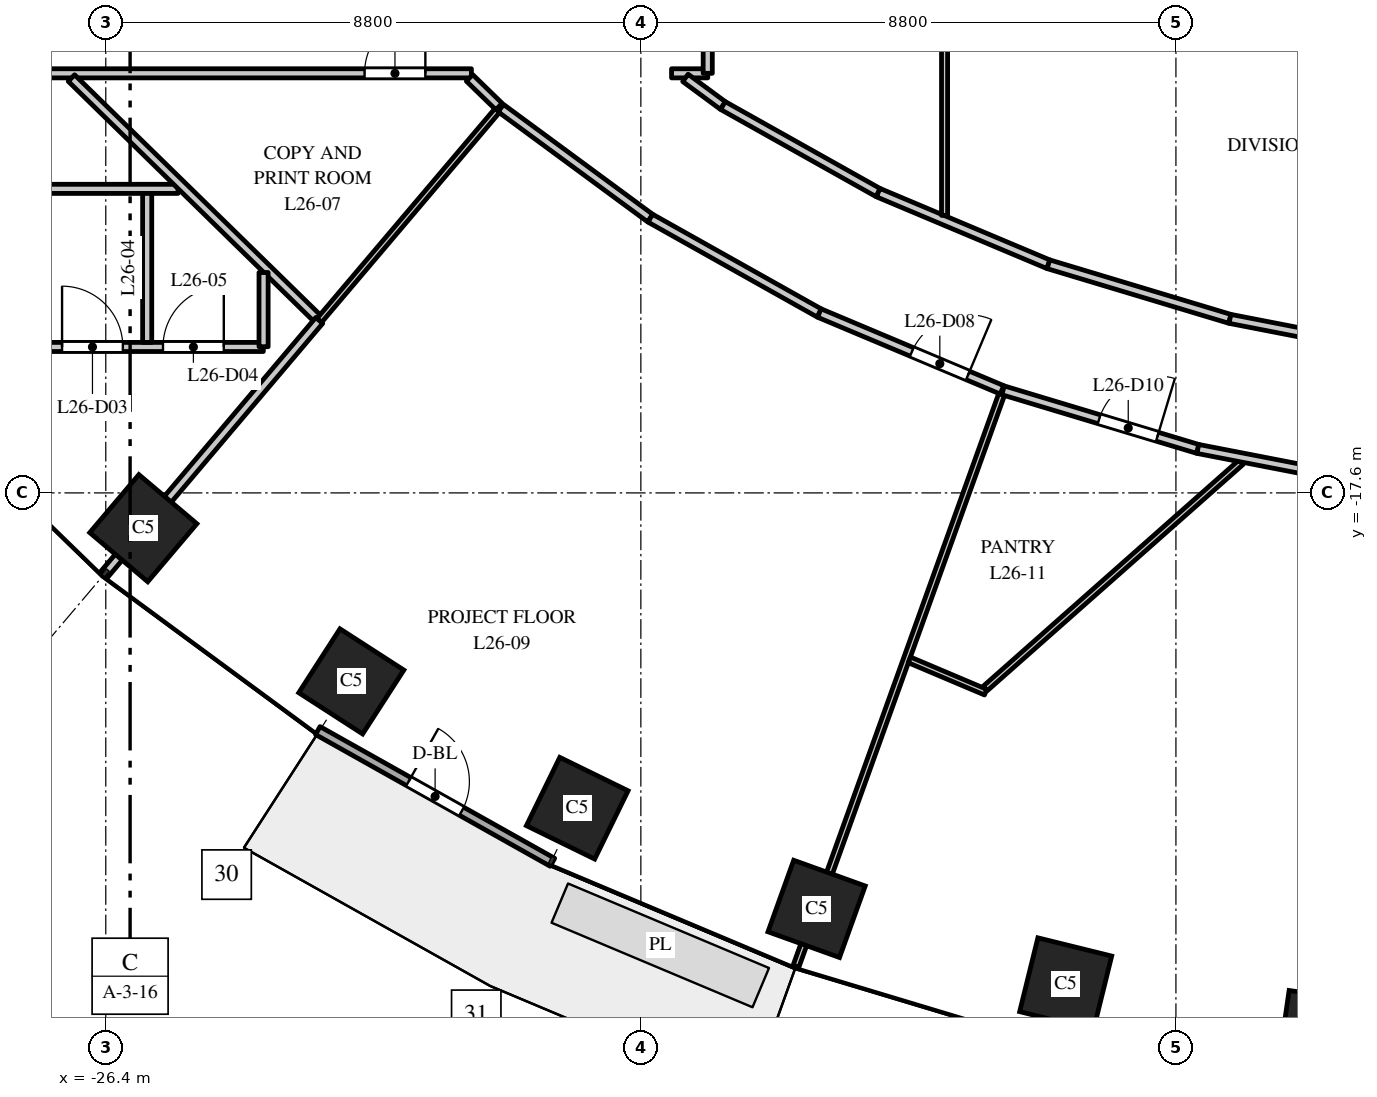
"""IFC4 building model, lengths in metres.
Left out: names, types, materials, properties, quantities, classifications, styles, units other than length and angle.
Written with IfcOpenShell. Run it as: python <this file> out.ifc"""

import sys

from ifc_helpers import new_model, si_unit, direction, frame, frame_2d, origin, origin_2d, place, context, subcontext, project, spatial, rectangle, extrude, element, fill, save


model = new_model("IFC4")
c1 = context("Model", 3, precision=1e-05, world=origin(), true_north=direction((0.0, 1.0)))
c2 = subcontext(c1, "Body", "Model", "MODEL_VIEW")
j1 = project(units=[si_unit("LENGTHUNIT", "METRE"), si_unit("PLANEANGLEUNIT", "RADIAN")], contexts=[c1])
p1 = place(None, origin())
s1 = spatial("IfcSite", under=j1, at=p1, CompositionType="ELEMENT")
p2 = place(p1, origin())
s2 = spatial("IfcBuilding", under=s1, at=p2, CompositionType="ELEMENT")
p3 = place(p2, frame((0.0, 0.0, 116.0)))
s3 = spatial("IfcBuildingStorey", under=s2, at=p3, CompositionType="ELEMENT", Elevation=116.0)
for number, where, z_axis, x_axis in (
    (1, (-25.783, -18.18, 0.0), (0.0, 0.0, 1.0), (0.763, -0.646, 0.0)),
    (2, (-22.362, -20.7, 0.0), (0.0, 0.0, 1.0), (0.84, -0.542, 0.0)),
    (3, (-18.646, -22.785, 0.0), (0.0, 0.0, 1.0), (0.898, -0.439, 0.0)),
    (4, (-14.709, -24.441, 0.0), (0.0, 0.0, 1.0), (0.941, -0.338, 0.0)),
    (5, (-10.613, -25.674, 0.0), (0.0, 0.0, 1.0), (0.971, -0.24, 0.0)),
    (6, (-6.409, -26.491, 0.0), (0.0, 0.0, 1.0), (0.99, -0.143, 0.0)),
):
    element("IfcColumn", number, at=place(p3, frame(where, z_axis=z_axis, x_axis=x_axis)), inside=s3, PredefinedType="COLUMN", context=c2, shape_type="SweptSolid", body=[
        extrude(rectangle(XDim=1.25, YDim=1.25, at=origin_2d()), origin(), (0.0, 0.0, 1.0), 4.0),
    ])
p4 = place(p3, frame((-22.913, -21.509, 0.0), z_axis=(0.0, 0.0, 1.0), x_axis=(0.872046572975, -0.489422899509, 0.0)))
e7 = element("IfcWall", 7, at=p4, inside=s3, PredefinedType="STANDARD", context=c2, shape_type="SweptSolid", body=[
    extrude(rectangle(XDim=4.426, YDim=0.15, at=frame_2d((2.213, 0.0))), origin(), (0.0, 0.0, 1.0), 3.7),
])
p5 = place(p4, frame((1.713, 0.0, 0.0)))
e8 = element("IfcOpeningElement", 8, at=p5, cuts=e7, PredefinedType="OPENING", context=c2, shape_type="SweptSolid", body=[
    extrude(rectangle(XDim=1.0, YDim=2.4, at=frame_2d((0.5, 1.2))), frame((0.0, 0.085, 0.0), z_axis=(0.0, -1.0, 0.0), x_axis=(1.0, 0.0, 0.0)), (0.0, 0.0, 1.0), 0.17),
])
p6 = place(p3, frame((-31.5, -10.7, 0.0), z_axis=(0.0, 0.0, 1.0), x_axis=(1.0, 0.0, 0.0)))
e9 = element("IfcWall", 9, at=p6, inside=s3, PredefinedType="PARTITIONING", context=c2, shape_type="SweptSolid", body=[
    extrude(rectangle(XDim=11.113, YDim=0.15, at=frame_2d((5.557, 0.0))), origin(), (0.0, 0.0, 1.0), 3.1),
])
p7 = place(p6, frame((1.4, 0.0, 0.0)))
e10 = element("IfcOpeningElement", 10, at=p7, cuts=e9, PredefinedType="OPENING", context=c2, shape_type="SweptSolid", body=[
    extrude(rectangle(XDim=1.0, YDim=2.1, at=frame_2d((0.5, 1.05))), frame((0.0, 0.085, 0.0), z_axis=(0.0, -1.0, 0.0), x_axis=(1.0, 0.0, 0.0)), (0.0, 0.0, 1.0), 0.17),
])
p8 = place(p6, frame((9.356, 0.0, 0.0)))
e11 = element("IfcOpeningElement", 11, at=p8, cuts=e9, PredefinedType="OPENING", context=c2, shape_type="SweptSolid", body=[
    extrude(rectangle(XDim=1.0, YDim=2.1, at=frame_2d((0.5, 1.05))), frame((0.0, 0.085, 0.0), z_axis=(0.0, -1.0, 0.0), x_axis=(1.0, 0.0, 0.0)), (0.0, 0.0, 1.0), 0.17),
])
p9 = place(p3, frame((-29.605, -12.6, 0.0), z_axis=(0.0, 0.0, 1.0), x_axis=(1.0, 0.0, 0.0)))
e12 = element("IfcWall", 12, at=p9, inside=s3, PredefinedType="PARTITIONING", context=c2, shape_type="SweptSolid", body=[
    extrude(rectangle(XDim=4.393, YDim=0.15, at=frame_2d((2.197, 0.0))), origin(), (0.0, 0.0, 1.0), 3.7),
])
p10 = place(p3, frame((-29.601, -15.2, 0.0), z_axis=(0.0, 0.0, 1.0), x_axis=(1.0, 0.0, 0.0)))
e13 = element("IfcWall", 13, at=p10, inside=s3, PredefinedType="PARTITIONING", context=c2, shape_type="SweptSolid", body=[
    extrude(rectangle(XDim=5.792, YDim=0.15, at=frame_2d((2.896, 0.0))), origin(), (0.0, 0.0, 1.0), 2.9),
])
p11 = place(p10, frame((2.482, 0.0, 0.0)))
e14 = element("IfcOpeningElement", 14, at=p11, cuts=e13, PredefinedType="OPENING", context=c2, shape_type="SweptSolid", body=[
    extrude(rectangle(XDim=1.0, YDim=2.1, at=frame_2d((0.5, 1.05))), frame((0.0, 0.085, 0.0), z_axis=(0.0, -1.0, 0.0), x_axis=(1.0, 0.0, 0.0)), (0.0, 0.0, 1.0), 0.17),
])
p12 = place(p10, frame((4.142, 0.0, 0.0)))
e15 = element("IfcOpeningElement", 15, at=p12, cuts=e13, PredefinedType="OPENING", context=c2, shape_type="SweptSolid", body=[
    extrude(rectangle(XDim=1.0, YDim=2.1, at=frame_2d((0.5, 1.05))), frame((0.0, 0.085, 0.0), z_axis=(0.0, -1.0, 0.0), x_axis=(1.0, 0.0, 0.0)), (0.0, 0.0, 1.0), 0.17),
])
p13 = place(p3, frame((-26.965, -10.778, 0.0), z_axis=(0.0, 0.0, 1.0), x_axis=(0.715154119379, -0.698966798593, 0.0)))
e16 = element("IfcWall", 16, at=p13, inside=s3, PredefinedType="PARTITIONING", context=c2, shape_type="SweptSolid", body=[
    extrude(rectangle(XDim=5.701, YDim=0.15, at=frame_2d((2.851, 0.0))), origin(), (0.0, 0.0, 1.0), 3.7),
])
p14 = place(p3, frame((-26.43, -18.945, 0.0), z_axis=(0.0, 0.0, 1.0), x_axis=(0.646289642104, 0.763092195288, 0.0)))
e17 = element("IfcWall", 17, at=p14, inside=s3, PredefinedType="PARTITIONING", context=c2, shape_type="SweptSolid", body=[
    extrude(rectangle(XDim=5.48, YDim=0.15, at=frame_2d((2.74, 0.0))), origin(), (0.0, 0.0, 1.0), 2.75),
])
p15 = place(p3, frame((-25.719, -15.125, 0.0), z_axis=(0.0, 0.0, 1.0), x_axis=(0.0, 1.0, 0.0)))
e18 = element("IfcWall", 18, at=p15, inside=s3, PredefinedType="PARTITIONING", context=c2, shape_type="SweptSolid", body=[
    extrude(rectangle(XDim=2.45, YDim=0.15, at=frame_2d((1.225, 0.0))), origin(), (0.0, 0.0, 1.0), 3.7),
])
p16 = place(p3, frame((-23.805, -15.196, 0.0), z_axis=(0.0, 0.0, 1.0), x_axis=(0.0, 1.0, 0.0)))
e19 = element("IfcWall", 19, at=p16, inside=s3, PredefinedType="PARTITIONING", context=c2, shape_type="SweptSolid", body=[
    extrude(rectangle(XDim=1.22, YDim=0.15, at=frame_2d((0.61, 0.0))), origin(), (0.0, 0.0, 1.0), 3.7),
])
p17 = place(p3, frame((-22.888, -14.763, 0.0), z_axis=(0.0, 0.0, 1.0), x_axis=(0.646640834677, 0.7627946191, 0.0)))
e20 = element("IfcWall", 20, at=p17, inside=s3, PredefinedType="PARTITIONING", context=c2, shape_type="SweptSolid", body=[
    extrude(rectangle(XDim=4.588, YDim=0.1, at=frame_2d((2.294, 0.0))), origin(), (0.0, 0.0, 1.0), 3.7),
])
p18 = place(p3, frame((-20.418, -10.775, 0.0), z_axis=(0.0, 0.0, 1.0), x_axis=(0.717145300924, -0.69692368116, 0.0)))
e21 = element("IfcWall", 21, at=p18, inside=s3, PredefinedType="PARTITIONING", context=c2, shape_type="SweptSolid", body=[
    extrude(rectangle(XDim=0.676, YDim=0.15, at=frame_2d((0.338, 0.0))), origin(), (0.0, 0.0, 1.0), 3.7),
])
p19 = place(p3, frame((-19.903, -11.272, 0.0), z_axis=(0.0, 0.0, 1.0), x_axis=(0.805228684186, -0.592964388613, 0.0)))
e22 = element("IfcWall", 22, at=p19, inside=s3, PredefinedType="PARTITIONING", context=c2, shape_type="SweptSolid", body=[
    extrude(rectangle(XDim=3.052, YDim=0.15, at=frame_2d((1.526, 0.0))), origin(), (0.0, 0.0, 1.0), 2.75),
])
p20 = place(p3, frame((-17.445, -13.082, 0.0), z_axis=(0.0, 0.0, 1.0), x_axis=(0.872072095629, -0.489377420837, 0.0)))
e23 = element("IfcWall", 23, at=p20, inside=s3, PredefinedType="PARTITIONING", context=c2, shape_type="SweptSolid", body=[
    extrude(rectangle(XDim=3.188, YDim=0.15, at=frame_2d((1.594, 0.0))), origin(), (0.0, 0.0, 1.0), 3.7),
])
p21 = place(p3, frame((-17.095, -10.7, 0.0), z_axis=(0.0, 0.0, 1.0), x_axis=(1.0, 0.0, 0.0)))
e24 = element("IfcWall", 24, at=p21, inside=s3, PredefinedType="PARTITIONING", context=c2, shape_type="SweptSolid", body=[
    extrude(rectangle(XDim=0.595, YDim=0.15, at=frame_2d((0.297, 0.0))), origin(), (0.0, 0.0, 1.0), 3.7),
])
p22 = place(p3, frame((-16.867, -10.775, 0.0), z_axis=(0.0, 0.0, 1.0), x_axis=(0.804751563869, -0.593611759023, 0.0)))
e25 = element("IfcWall", 25, at=p22, inside=s3, PredefinedType="PARTITIONING", context=c2, shape_type="SweptSolid", body=[
    extrude(rectangle(XDim=0.767, YDim=0.15, at=frame_2d((0.383, 0.0))), origin(), (0.0, 0.0, 1.0), 3.7),
])
p23 = place(p3, frame((-16.5, -10.7, 0.0), z_axis=(0.0, 0.0, 1.0), x_axis=(0.0, 1.0, 0.0)))
e26 = element("IfcWall", 26, at=p23, inside=s3, PredefinedType="PARTITIONING", context=c2, shape_type="SweptSolid", body=[
    extrude(rectangle(XDim=0.736, YDim=0.15, at=frame_2d((0.368, 0.0))), origin(), (0.0, 0.0, 1.0), 3.7),
])
p24 = place(p3, frame((-16.25, -11.23, 0.0), z_axis=(0.0, 0.0, 1.0), x_axis=(0.872147381065, -0.489243237767, 0.0)))
e27 = element("IfcWall", 27, at=p24, inside=s3, PredefinedType="PARTITIONING", context=c2, shape_type="SweptSolid", body=[
    extrude(rectangle(XDim=2.927, YDim=0.15, at=frame_2d((1.464, 0.0))), origin(), (0.0, 0.0, 1.0), 2.75),
])
p25 = place(p3, frame((-15.048, -25.383, 0.0), z_axis=(0.0, 0.0, 1.0), x_axis=(0.338391154788, 0.941005540027, 0.0)))
e28 = element("IfcWall", 28, at=p25, inside=s3, PredefinedType="PARTITIONING", context=c2, shape_type="SweptSolid", body=[
    extrude(rectangle(XDim=10.06, YDim=0.1, at=frame_2d((5.03, 0.0))), origin(), (0.0, 0.0, 1.0), 2.9),
])
p26 = place(p3, frame((-14.665, -14.642, 0.0), z_axis=(0.0, 0.0, 1.0), x_axis=(0.921850993012, -0.387544509293, 0.0)))
e29 = element("IfcWall", 29, at=p26, inside=s3, PredefinedType="PARTITIONING", context=c2, shape_type="SweptSolid", body=[
    extrude(rectangle(XDim=3.259, YDim=0.15, at=frame_2d((1.629, 0.0))), origin(), (0.0, 0.0, 1.0), 2.85),
])
p27 = place(p26, frame((1.65, 0.0, 0.0)))
e30 = element("IfcOpeningElement", 30, at=p27, cuts=e29, PredefinedType="OPENING", context=c2, shape_type="SweptSolid", body=[
    extrude(rectangle(XDim=1.0, YDim=2.1, at=frame_2d((0.5, 1.05))), frame((0.0, 0.085, 0.0), z_axis=(0.0, -1.0, 0.0), x_axis=(1.0, 0.0, 0.0)), (0.0, 0.0, 1.0), 0.17),
])
p28 = place(p3, frame((-13.697, -12.662, 0.0), z_axis=(0.0, 0.0, 1.0), x_axis=(0.921751821358, -0.387780324183, 0.0)))
e31 = element("IfcWall", 31, at=p28, inside=s3, PredefinedType="PARTITIONING", context=c2, shape_type="SweptSolid", body=[
    extrude(rectangle(XDim=3.038, YDim=0.15, at=frame_2d((1.519, 0.0))), origin(), (0.0, 0.0, 1.0), 2.85),
])
p29 = place(p3, frame((-13.184, -20.346, 0.0), z_axis=(0.0, 0.0, 1.0), x_axis=(0.920969723526, -0.389634146794, 0.0)))
e32 = element("IfcWall", 32, at=p29, inside=s3, PredefinedType="PARTITIONING", context=c2, shape_type="SweptSolid", body=[
    extrude(rectangle(XDim=1.363, YDim=0.1, at=frame_2d((0.681, 0.0))), origin(), (0.0, 0.0, 1.0), 3.7),
])
p30 = place(p3, frame((-12.605, -13.036, 0.0), z_axis=(0.0, 0.0, 1.0), x_axis=(0.0, 1.0, 0.0)))
e33 = element("IfcWall", 33, at=p30, inside=s3, PredefinedType="PARTITIONING", context=c2, shape_type="SweptSolid", body=[
    extrude(rectangle(XDim=26.072, YDim=0.1, at=frame_2d((13.036, 0.0))), origin(), (0.0, 0.0, 1.0), 2.75),
])
p31 = place(p3, frame((-11.938, -20.818, 0.0), z_axis=(0.0, 0.0, 1.0), x_axis=(0.749089420646, 0.662468897289, 0.0)))
e34 = element("IfcWall", 34, at=p31, inside=s3, PredefinedType="PARTITIONING", context=c2, shape_type="SweptSolid", body=[
    extrude(rectangle(XDim=5.62, YDim=0.1, at=frame_2d((2.81, 0.0))), origin(), (0.0, 0.0, 1.0), 3.7),
])
p32 = place(p3, frame((-11.643, -15.913, 0.0), z_axis=(0.0, 0.0, 1.0), x_axis=(0.957584891346, -0.288151307243, 0.0)))
e35 = element("IfcWall", 35, at=p32, inside=s3, PredefinedType="PARTITIONING", context=c2, shape_type="SweptSolid", body=[
    extrude(rectangle(XDim=3.345, YDim=0.15, at=frame_2d((1.672, 0.0))), origin(), (0.0, 0.0, 1.0), 3.7),
])
p33 = place(p32, frame((1.65, 0.0, 0.0)))
e36 = element("IfcOpeningElement", 36, at=p33, cuts=e35, PredefinedType="OPENING", context=c2, shape_type="SweptSolid", body=[
    extrude(rectangle(XDim=1.0, YDim=2.1, at=frame_2d((0.5, 1.05))), frame((0.0, 0.085, 0.0), z_axis=(0.0, -1.0, 0.0), x_axis=(1.0, 0.0, 0.0)), (0.0, 0.0, 1.0), 0.17),
])
p34 = place(p3, frame((-10.897, -13.84, 0.0), z_axis=(0.0, 0.0, 1.0), x_axis=(0.957606118849, -0.28808075455, 0.0)))
e37 = element("IfcWall", 37, at=p34, inside=s3, PredefinedType="PARTITIONING", context=c2, shape_type="SweptSolid", body=[
    extrude(rectangle(XDim=3.117, YDim=0.15, at=frame_2d((1.559, 0.0))), origin(), (0.0, 0.0, 1.0), 3.7),
])
p35 = place(p3, frame((-8.44, -16.877, 0.0), z_axis=(0.0, 0.0, 1.0), x_axis=(0.981665220565, -0.190613207134, 0.0)))
e38 = element("IfcWall", 38, at=p35, inside=s3, PredefinedType="PARTITIONING", context=c2, shape_type="SweptSolid", body=[
    extrude(rectangle(XDim=3.389, YDim=0.15, at=frame_2d((1.695, 0.0))), origin(), (0.0, 0.0, 1.0), 2.85),
])
p36 = place(p3, frame((-7.912, -14.738, 0.0), z_axis=(0.0, 0.0, 1.0), x_axis=(0.981588545092, -0.191007665145, 0.0)))
e39 = element("IfcWall", 39, at=p36, inside=s3, PredefinedType="PARTITIONING", context=c2, shape_type="SweptSolid", body=[
    extrude(rectangle(XDim=3.172, YDim=0.15, at=frame_2d((1.586, 0.0))), origin(), (0.0, 0.0, 1.0), 2.85),
])
p37 = place(p5, origin())
e40 = element("IfcDoor", 40, at=p37, inside=s3, OperationType="SINGLE_SWING_LEFT", PredefinedType="DOOR", context=c2, shape_type="SweptSolid", body=[
    extrude(rectangle(XDim=1.0, YDim=2.4, at=frame_2d((0.5, 1.2))), frame((0.0, 0.025, 0.0), z_axis=(0.0, -1.0, 0.0), x_axis=(1.0, 0.0, 0.0)), (0.0, 0.0, 1.0), 0.05),
])
fill(e8, e40)
p38 = place(p11, origin())
e41 = element("IfcDoor", 41, at=p38, inside=s3, OperationType="SINGLE_SWING_LEFT", PredefinedType="DOOR", context=c2, shape_type="SweptSolid", body=[
    extrude(rectangle(XDim=1.0, YDim=2.1, at=frame_2d((0.5, 1.05))), frame((0.0, 0.025, 0.0), z_axis=(0.0, -1.0, 0.0), x_axis=(1.0, 0.0, 0.0)), (0.0, 0.0, 1.0), 0.05),
])
fill(e14, e41)
p39 = place(p12, origin())
e42 = element("IfcDoor", 42, at=p39, inside=s3, OperationType="SINGLE_SWING_RIGHT", PredefinedType="DOOR", context=c2, shape_type="SweptSolid", body=[
    extrude(rectangle(XDim=1.0, YDim=2.1, at=frame_2d((0.5, 1.05))), frame((0.0, 0.025, 0.0), z_axis=(0.0, -1.0, 0.0), x_axis=(1.0, 0.0, 0.0)), (0.0, 0.0, 1.0), 0.05),
])
fill(e15, e42)
p40 = place(p8, origin())
e43 = element("IfcDoor", 43, at=p40, inside=s3, OperationType="SINGLE_SWING_RIGHT", PredefinedType="DOOR", context=c2, shape_type="SweptSolid", body=[
    extrude(rectangle(XDim=1.0, YDim=2.1, at=frame_2d((0.5, 1.05))), frame((0.0, 0.025, 0.0), z_axis=(0.0, -1.0, 0.0), x_axis=(1.0, 0.0, 0.0)), (0.0, 0.0, 1.0), 0.05),
])
fill(e11, e43)
p41 = place(p27, origin())
e44 = element("IfcDoor", 44, at=p41, inside=s3, OperationType="SINGLE_SWING_RIGHT", PredefinedType="DOOR", context=c2, shape_type="SweptSolid", body=[
    extrude(rectangle(XDim=1.0, YDim=2.1, at=frame_2d((0.5, 1.05))), frame((0.0, 0.025, 0.0), z_axis=(0.0, -1.0, 0.0), x_axis=(1.0, 0.0, 0.0)), (0.0, 0.0, 1.0), 0.05),
])
fill(e30, e44)
p42 = place(p33, origin())
e45 = element("IfcDoor", 45, at=p42, inside=s3, OperationType="SINGLE_SWING_RIGHT", PredefinedType="DOOR", context=c2, shape_type="SweptSolid", body=[
    extrude(rectangle(XDim=1.0, YDim=2.1, at=frame_2d((0.5, 1.05))), frame((0.0, 0.025, 0.0), z_axis=(0.0, -1.0, 0.0), x_axis=(1.0, 0.0, 0.0)), (0.0, 0.0, 1.0), 0.05),
])
fill(e36, e45)
save(model, sys.argv[1])
